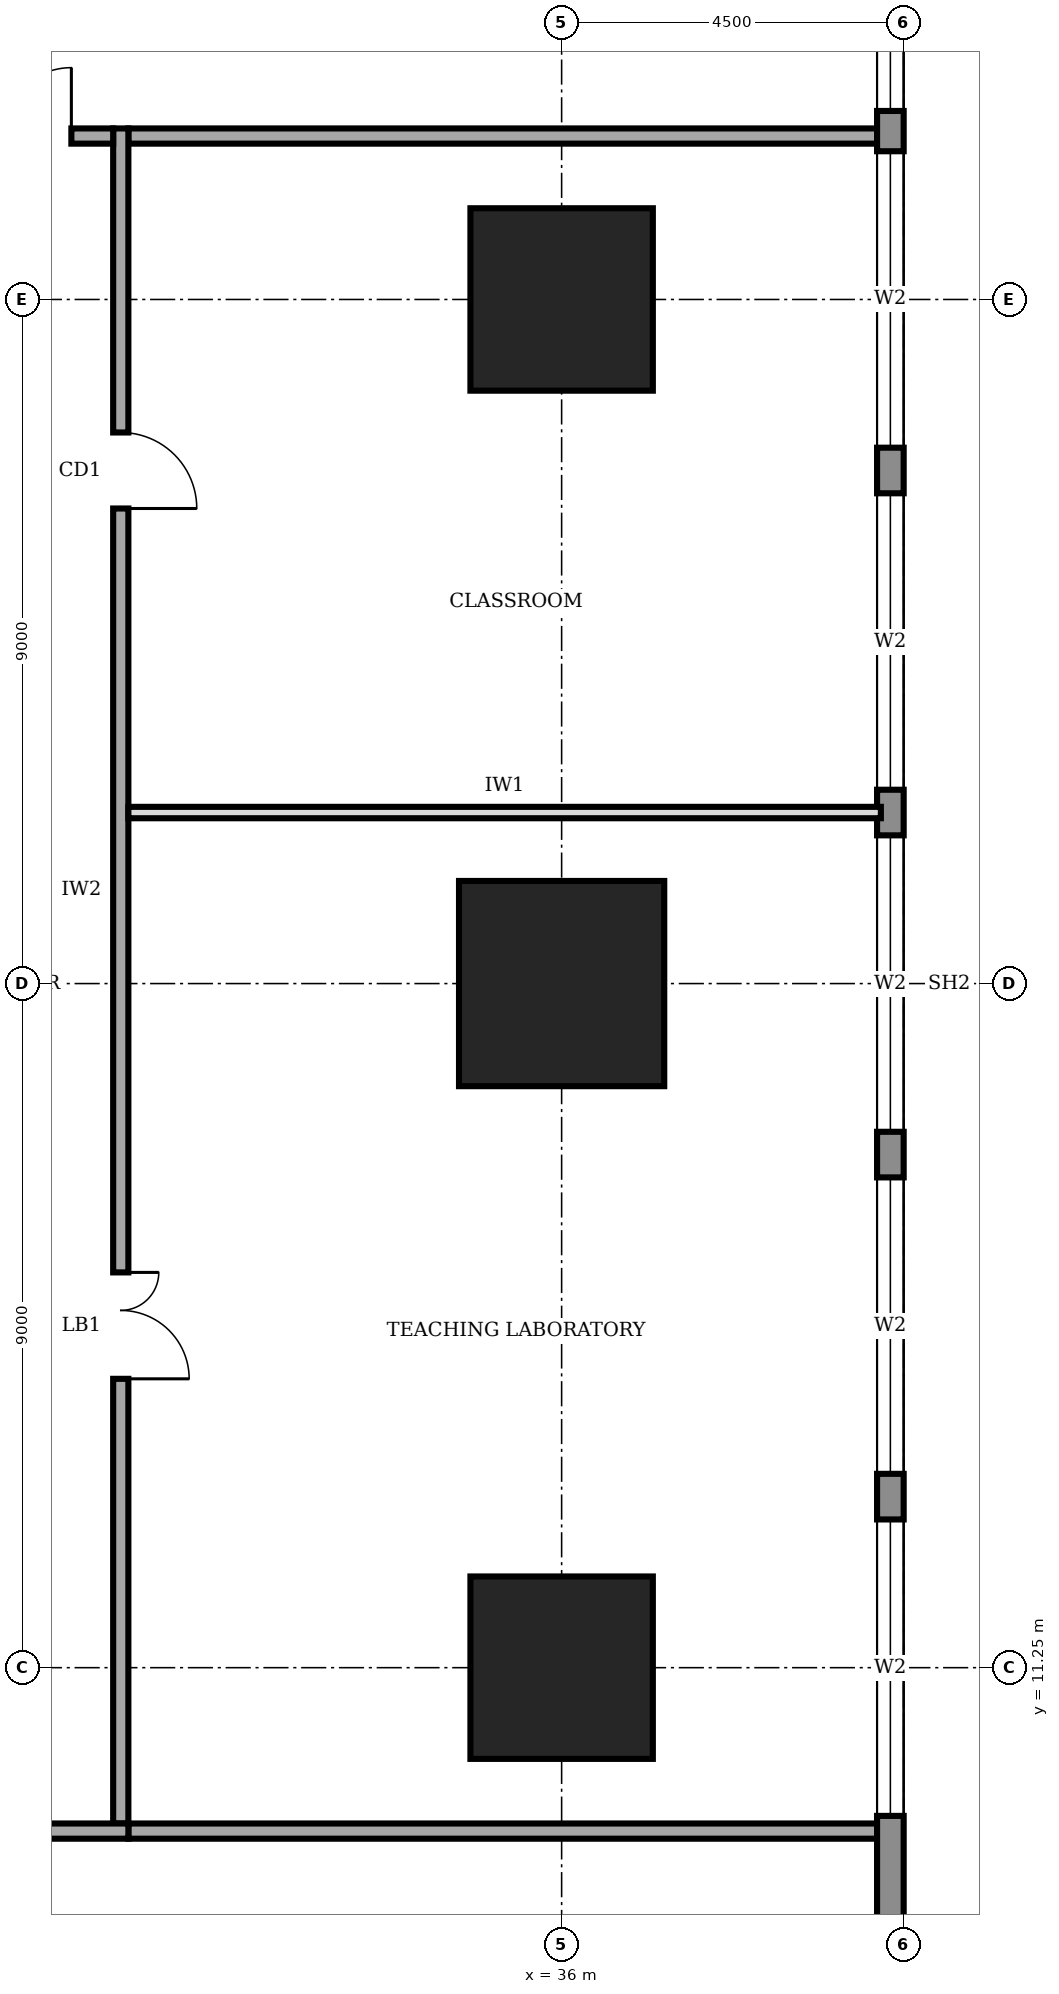
"""IFC4 building model, lengths in metres.
Left out: names, types, materials, properties, quantities, classifications, styles, units other than length and angle.
Written with IfcOpenShell. Run it as: python <this file> out.ifc"""

import sys

from ifc_helpers import new_model, si_unit, direction, frame, frame_2d, origin, origin_2d, place, context, subcontext, project, spatial, rectangle, extrude, element, fill, save


model = new_model("IFC4")
c1 = context("Model", 3, precision=1e-05, world=origin(), true_north=direction((0.0, 1.0)))
c2 = subcontext(c1, "Body", "Model", "MODEL_VIEW")
j1 = project(units=[si_unit("LENGTHUNIT", "METRE"), si_unit("PLANEANGLEUNIT", "RADIAN")], contexts=[c1])
p1 = place(None, origin())
s1 = spatial("IfcSite", under=j1, at=p1, CompositionType="ELEMENT")
p2 = place(p1, origin())
s2 = spatial("IfcBuilding", under=s1, at=p2, CompositionType="ELEMENT")
p3 = place(p2, frame((0.0, 0.0, 69.0)))
s3 = spatial("IfcBuildingStorey", under=s2, at=p3, CompositionType="ELEMENT", Elevation=69.0)
p4 = place(p3, frame((36.0, 11.25, 0.0), z_axis=(0.0, 0.0, 1.0), x_axis=(1.0, 0.0, 0.0)))
e1 = element("IfcColumn", 1, at=p4, inside=s3, PredefinedType="COLUMN", context=c2, shape_type="SweptSolid", body=[
    extrude(rectangle(XDim=2.4, YDim=2.4, at=origin_2d()), origin(), (0.0, 0.0, 1.0), 4.0),
])
p5 = place(p3, frame((36.0, 20.25, 0.0), z_axis=(0.0, 0.0, 1.0), x_axis=(1.0, 0.0, 0.0)))
e2 = element("IfcColumn", 2, at=p5, inside=s3, PredefinedType="COLUMN", context=c2, shape_type="SweptSolid", body=[
    extrude(rectangle(XDim=2.7, YDim=2.7, at=origin_2d()), origin(), (0.0, 0.0, 1.0), 4.0),
])
p6 = place(p3, frame((36.0, 29.25, 0.0), z_axis=(0.0, 0.0, 1.0), x_axis=(1.0, 0.0, 0.0)))
e3 = element("IfcColumn", 3, at=p6, inside=s3, PredefinedType="COLUMN", context=c2, shape_type="SweptSolid", body=[
    extrude(rectangle(XDim=2.4, YDim=2.4, at=origin_2d()), origin(), (0.0, 0.0, 1.0), 4.0),
])
p7 = place(p3, frame((40.325, 4.52, 0.0), z_axis=(0.0, 0.0, 1.0), x_axis=(0.0, 1.0, 0.0)))
e4 = element("IfcWall", 4, at=p7, inside=s3, PredefinedType="STANDARD", context=c2, shape_type="SweptSolid", body=[
    extrude(rectangle(XDim=31.46, YDim=0.35, at=frame_2d((15.73, 0.0))), origin(), (0.0, 0.0, 1.0), 3.75),
])
p8 = place(p7, frame((4.78, 0.0, 0.6)))
e5 = element("IfcOpeningElement", 5, at=p8, cuts=e4, PredefinedType="OPENING", context=c2, shape_type="SweptSolid", body=[
    extrude(rectangle(XDim=3.9, YDim=2.6, at=frame_2d((1.95, 1.3))), frame((0.0, 0.185, 0.0), z_axis=(0.0, -1.0, 0.0), x_axis=(1.0, 0.0, 0.0)), (0.0, 0.0, 1.0), 0.37),
])
p9 = place(p7, frame((9.28, 0.0, 0.6)))
e6 = element("IfcOpeningElement", 6, at=p9, cuts=e4, PredefinedType="OPENING", context=c2, shape_type="SweptSolid", body=[
    extrude(rectangle(XDim=3.9, YDim=2.6, at=frame_2d((1.95, 1.3))), frame((0.0, 0.185, 0.0), z_axis=(0.0, -1.0, 0.0), x_axis=(1.0, 0.0, 0.0)), (0.0, 0.0, 1.0), 0.37),
])
p10 = place(p7, frame((13.78, 0.0, 0.6)))
e7 = element("IfcOpeningElement", 7, at=p10, cuts=e4, PredefinedType="OPENING", context=c2, shape_type="SweptSolid", body=[
    extrude(rectangle(XDim=3.9, YDim=2.6, at=frame_2d((1.95, 1.3))), frame((0.0, 0.185, 0.0), z_axis=(0.0, -1.0, 0.0), x_axis=(1.0, 0.0, 0.0)), (0.0, 0.0, 1.0), 0.37),
])
p11 = place(p7, frame((18.28, 0.0, 0.6)))
e8 = element("IfcOpeningElement", 8, at=p11, cuts=e4, PredefinedType="OPENING", context=c2, shape_type="SweptSolid", body=[
    extrude(rectangle(XDim=3.9, YDim=2.6, at=frame_2d((1.95, 1.3))), frame((0.0, 0.185, 0.0), z_axis=(0.0, -1.0, 0.0), x_axis=(1.0, 0.0, 0.0)), (0.0, 0.0, 1.0), 0.37),
])
p12 = place(p7, frame((22.78, 0.0, 0.6)))
e9 = element("IfcOpeningElement", 9, at=p12, cuts=e4, PredefinedType="OPENING", context=c2, shape_type="SweptSolid", body=[
    extrude(rectangle(XDim=3.9, YDim=2.6, at=frame_2d((1.95, 1.3))), frame((0.0, 0.185, 0.0), z_axis=(0.0, -1.0, 0.0), x_axis=(1.0, 0.0, 0.0)), (0.0, 0.0, 1.0), 0.37),
])
p13 = place(p7, frame((27.21, 0.0, 0.6)))
e10 = element("IfcOpeningElement", 10, at=p13, cuts=e4, PredefinedType="OPENING", context=c2, shape_type="SweptSolid", body=[
    extrude(rectangle(XDim=3.9, YDim=2.6, at=frame_2d((1.95, 1.3))), frame((0.0, 0.185, 0.0), z_axis=(0.0, -1.0, 0.0), x_axis=(1.0, 0.0, 0.0)), (0.0, 0.0, 1.0), 0.37),
])
p14 = place(p3, frame((11.9, 9.1, 0.0), z_axis=(0.0, 0.0, 1.0), x_axis=(1.0, 0.0, 0.0)))
e11 = element("IfcWall", 11, at=p14, inside=s3, PredefinedType="SOLIDWALL", context=c2, shape_type="SweptSolid", body=[
    extrude(rectangle(XDim=18.4, YDim=0.2, at=frame_2d((9.2, 0.0))), origin(), (0.0, 0.0, 1.0), 3.75),
])
p15 = place(p14, frame((2.25, 0.0, 0.0)))
e12 = element("IfcOpeningElement", 12, at=p15, cuts=e11, PredefinedType="OPENING", context=c2, shape_type="SweptSolid", body=[
    extrude(rectangle(XDim=1.4, YDim=2.1, at=frame_2d((0.7, 1.05))), frame((0.0, 0.11, 0.0), z_axis=(0.0, -1.0, 0.0), x_axis=(1.0, 0.0, 0.0)), (0.0, 0.0, 1.0), 0.22),
])
p16 = place(p14, frame((7.85, 0.0, 0.0)))
e13 = element("IfcOpeningElement", 13, at=p16, cuts=e11, PredefinedType="OPENING", context=c2, shape_type="SweptSolid", body=[
    extrude(rectangle(XDim=1.0, YDim=2.1, at=frame_2d((0.5, 1.05))), frame((0.0, 0.11, 0.0), z_axis=(0.0, -1.0, 0.0), x_axis=(1.0, 0.0, 0.0)), (0.0, 0.0, 1.0), 0.22),
])
p17 = place(p14, frame((13.8, 0.0, 0.0)))
e14 = element("IfcOpeningElement", 14, at=p17, cuts=e11, PredefinedType="OPENING", context=c2, shape_type="SweptSolid", body=[
    extrude(rectangle(XDim=1.4, YDim=2.1, at=frame_2d((0.7, 1.05))), frame((0.0, 0.11, 0.0), z_axis=(0.0, -1.0, 0.0), x_axis=(1.0, 0.0, 0.0)), (0.0, 0.0, 1.0), 0.22),
])
p18 = place(p3, frame((30.2, 9.2, 0.0), z_axis=(0.0, 0.0, 1.0), x_axis=(0.0, 1.0, 0.0)))
e15 = element("IfcWall", 15, at=p18, inside=s3, PredefinedType="SOLIDWALL", context=c2, shape_type="SweptSolid", body=[
    extrude(rectangle(XDim=22.3, YDim=0.2, at=frame_2d((11.15, 0.0))), origin(), (0.0, 0.0, 1.0), 3.75),
])
p19 = place(p18, frame((5.85, 0.0, 0.0)))
e16 = element("IfcOpeningElement", 16, at=p19, cuts=e15, PredefinedType="OPENING", context=c2, shape_type="SweptSolid", body=[
    extrude(rectangle(XDim=1.4, YDim=2.1, at=frame_2d((0.7, 1.05))), frame((0.0, 0.11, 0.0), z_axis=(0.0, -1.0, 0.0), x_axis=(1.0, 0.0, 0.0)), (0.0, 0.0, 1.0), 0.22),
])
p20 = place(p18, frame((17.3, 0.0, 0.0)))
e17 = element("IfcOpeningElement", 17, at=p20, cuts=e15, PredefinedType="OPENING", context=c2, shape_type="SweptSolid", body=[
    extrude(rectangle(XDim=1.0, YDim=2.1, at=frame_2d((0.5, 1.05))), frame((0.0, 0.11, 0.0), z_axis=(0.0, -1.0, 0.0), x_axis=(1.0, 0.0, 0.0)), (0.0, 0.0, 1.0), 0.22),
])
p21 = place(p3, frame((30.1, 31.4, 0.0), z_axis=(0.0, 0.0, 1.0), x_axis=(-1.0, 0.0, 0.0)))
e18 = element("IfcWall", 18, at=p21, inside=s3, PredefinedType="SOLIDWALL", context=c2, shape_type="SweptSolid", body=[
    extrude(rectangle(XDim=18.4, YDim=0.2, at=frame_2d((9.2, 0.0))), origin(), (0.0, 0.0, 1.0), 3.75),
])
p22 = place(p21, frame((14.55, 0.0, 0.0)))
e19 = element("IfcOpeningElement", 19, at=p22, cuts=e18, PredefinedType="OPENING", context=c2, shape_type="SweptSolid", body=[
    extrude(rectangle(XDim=1.4, YDim=2.1, at=frame_2d((0.7, 1.05))), frame((0.0, 0.11, 0.0), z_axis=(0.0, -1.0, 0.0), x_axis=(1.0, 0.0, 0.0)), (0.0, 0.0, 1.0), 0.22),
])
p23 = place(p21, frame((7.1, 0.0, 0.0)))
e20 = element("IfcOpeningElement", 20, at=p23, cuts=e18, PredefinedType="OPENING", context=c2, shape_type="SweptSolid", body=[
    extrude(rectangle(XDim=1.0, YDim=2.1, at=frame_2d((0.5, 1.05))), frame((0.0, 0.11, 0.0), z_axis=(0.0, -1.0, 0.0), x_axis=(1.0, 0.0, 0.0)), (0.0, 0.0, 1.0), 0.22),
])
p24 = place(p21, frame((0.55, 0.0, 0.0)))
e21 = element("IfcOpeningElement", 21, at=p24, cuts=e18, PredefinedType="OPENING", context=c2, shape_type="SweptSolid", body=[
    extrude(rectangle(XDim=1.8, YDim=2.1, at=frame_2d((0.9, 1.05))), frame((0.0, 0.11, 0.0), z_axis=(0.0, -1.0, 0.0), x_axis=(1.0, 0.0, 0.0)), (0.0, 0.0, 1.0), 0.22),
])
for number, where, z_axis, x_axis in (
    (22, (30.3, 9.1, 0.0), (0.0, 0.0, 1.0), (1.0, 0.0, 0.0)),
    (23, (30.3, 31.4, 0.0), (0.0, 0.0, 1.0), (1.0, 0.0, 0.0)),
):
    element("IfcWall", number, at=place(p3, frame(where, z_axis=z_axis, x_axis=x_axis)), inside=s3, PredefinedType="SOLIDWALL", context=c2, shape_type="SweptSolid", body=[
        extrude(rectangle(XDim=9.9, YDim=0.2, at=frame_2d((4.95, 0.0))), origin(), (0.0, 0.0, 1.0), 3.75),
    ])
p25 = place(p3, frame((30.3, 22.5, 0.0), z_axis=(0.0, 0.0, 1.0), x_axis=(1.0, 0.0, 0.0)))
e24 = element("IfcWall", 24, at=p25, inside=s3, PredefinedType="PARTITIONING", context=c2, shape_type="SweptSolid", body=[
    extrude(rectangle(XDim=9.9, YDim=0.15, at=frame_2d((4.95, 0.0))), origin(), (0.0, 0.0, 1.0), 3.75),
])
p26 = place(p8, origin())
e25 = element("IfcWindow", 25, at=p26, inside=s3, PartitioningType="SINGLE_PANEL", PredefinedType="WINDOW", context=c2, shape_type="SweptSolid", body=[
    extrude(rectangle(XDim=3.9, YDim=2.6, at=frame_2d((1.95, 1.3))), frame((0.0, 0.03, 0.0), z_axis=(0.0, -1.0, 0.0), x_axis=(1.0, 0.0, 0.0)), (0.0, 0.0, 1.0), 0.06),
])
fill(e5, e25)
p27 = place(p9, origin())
e26 = element("IfcWindow", 26, at=p27, inside=s3, PartitioningType="SINGLE_PANEL", PredefinedType="WINDOW", context=c2, shape_type="SweptSolid", body=[
    extrude(rectangle(XDim=3.9, YDim=2.6, at=frame_2d((1.95, 1.3))), frame((0.0, 0.03, 0.0), z_axis=(0.0, -1.0, 0.0), x_axis=(1.0, 0.0, 0.0)), (0.0, 0.0, 1.0), 0.06),
])
fill(e6, e26)
p28 = place(p10, origin())
e27 = element("IfcWindow", 27, at=p28, inside=s3, PartitioningType="SINGLE_PANEL", PredefinedType="WINDOW", context=c2, shape_type="SweptSolid", body=[
    extrude(rectangle(XDim=3.9, YDim=2.6, at=frame_2d((1.95, 1.3))), frame((0.0, 0.03, 0.0), z_axis=(0.0, -1.0, 0.0), x_axis=(1.0, 0.0, 0.0)), (0.0, 0.0, 1.0), 0.06),
])
fill(e7, e27)
p29 = place(p11, origin())
e28 = element("IfcWindow", 28, at=p29, inside=s3, PartitioningType="SINGLE_PANEL", PredefinedType="WINDOW", context=c2, shape_type="SweptSolid", body=[
    extrude(rectangle(XDim=3.9, YDim=2.6, at=frame_2d((1.95, 1.3))), frame((0.0, 0.03, 0.0), z_axis=(0.0, -1.0, 0.0), x_axis=(1.0, 0.0, 0.0)), (0.0, 0.0, 1.0), 0.06),
])
fill(e8, e28)
p30 = place(p12, origin())
e29 = element("IfcWindow", 29, at=p30, inside=s3, PartitioningType="SINGLE_PANEL", PredefinedType="WINDOW", context=c2, shape_type="SweptSolid", body=[
    extrude(rectangle(XDim=3.9, YDim=2.6, at=frame_2d((1.95, 1.3))), frame((0.0, 0.03, 0.0), z_axis=(0.0, -1.0, 0.0), x_axis=(1.0, 0.0, 0.0)), (0.0, 0.0, 1.0), 0.06),
])
fill(e9, e29)
p31 = place(p13, origin())
e30 = element("IfcWindow", 30, at=p31, inside=s3, PartitioningType="SINGLE_PANEL", PredefinedType="WINDOW", context=c2, shape_type="SweptSolid", body=[
    extrude(rectangle(XDim=3.9, YDim=2.6, at=frame_2d((1.95, 1.3))), frame((0.0, 0.03, 0.0), z_axis=(0.0, -1.0, 0.0), x_axis=(1.0, 0.0, 0.0)), (0.0, 0.0, 1.0), 0.06),
])
fill(e10, e30)
p32 = place(p19, frame((1.4, 0.0, 0.0), z_axis=(0.0, 0.0, 1.0), x_axis=(-1.0, 0.0, 0.0)))
e31 = element("IfcDoor", 31, at=p32, inside=s3, OperationType="DOUBLE_DOOR_SINGLE_SWING", PredefinedType="DOOR", context=c2, shape_type="SweptSolid", body=[
    extrude(rectangle(XDim=1.4, YDim=2.1, at=frame_2d((0.7, 1.05))), frame((0.0, 0.025, 0.0), z_axis=(0.0, -1.0, 0.0), x_axis=(1.0, 0.0, 0.0)), (0.0, 0.0, 1.0), 0.05),
])
fill(e16, e31)
p33 = place(p20, frame((1.0, 0.0, 0.0), z_axis=(0.0, 0.0, 1.0), x_axis=(-1.0, 0.0, 0.0)))
e32 = element("IfcDoor", 32, at=p33, inside=s3, OperationType="SINGLE_SWING_RIGHT", PredefinedType="DOOR", context=c2, shape_type="SweptSolid", body=[
    extrude(rectangle(XDim=1.0, YDim=2.1, at=frame_2d((0.5, 1.05))), frame((0.0, 0.025, 0.0), z_axis=(0.0, -1.0, 0.0), x_axis=(1.0, 0.0, 0.0)), (0.0, 0.0, 1.0), 0.05),
])
fill(e17, e32)
p34 = place(p24, frame((1.8, 0.0, 0.0), z_axis=(0.0, 0.0, 1.0), x_axis=(-1.0, 0.0, 0.0)))
e33 = element("IfcDoor", 33, at=p34, inside=s3, OperationType="DOUBLE_DOOR_SINGLE_SWING", PredefinedType="DOOR", context=c2, shape_type="SweptSolid", body=[
    extrude(rectangle(XDim=1.8, YDim=2.1, at=frame_2d((0.9, 1.05))), frame((0.0, 0.025, 0.0), z_axis=(0.0, -1.0, 0.0), x_axis=(1.0, 0.0, 0.0)), (0.0, 0.0, 1.0), 0.05),
])
fill(e21, e33)
save(model, sys.argv[1])
